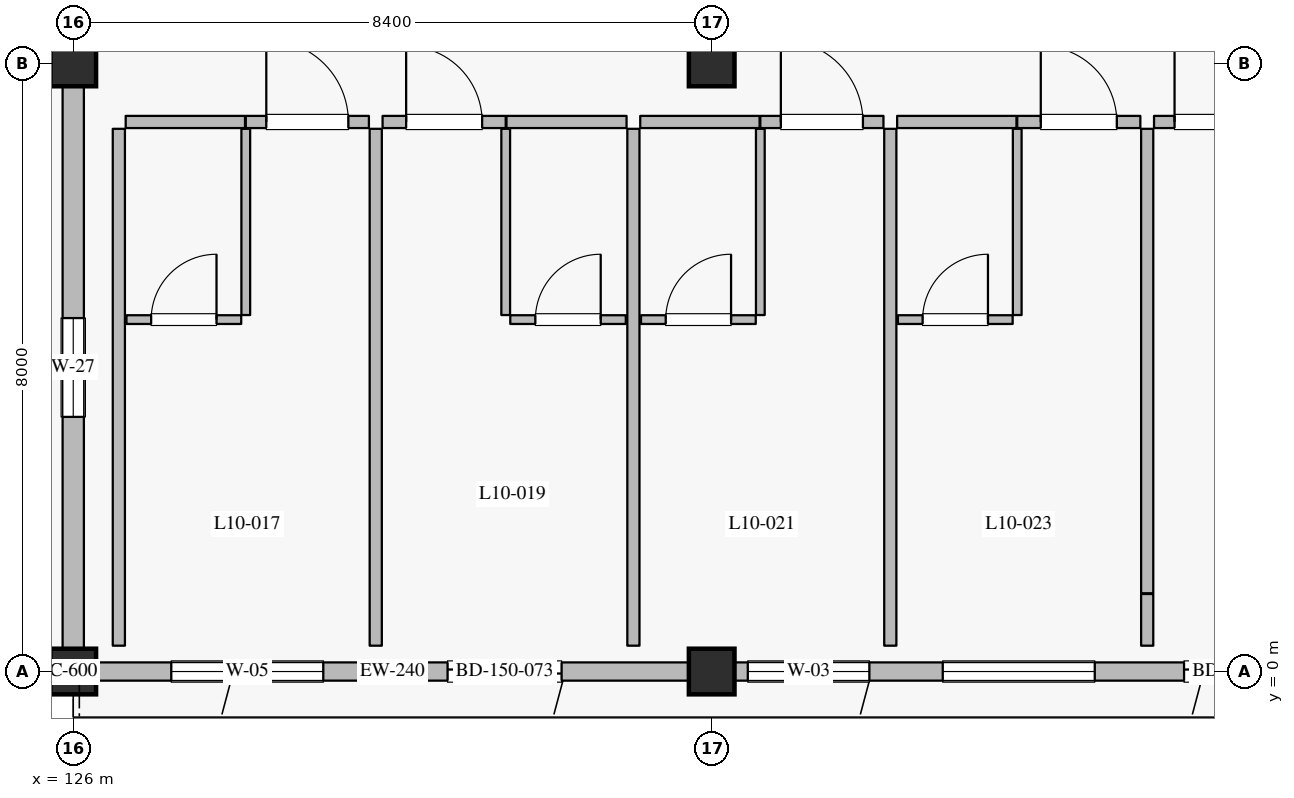
"""IFC4 building model, lengths in metres.
Left out: names, types, materials, properties, quantities, classifications, styles, units other than length and angle.
Written with IfcOpenShell. Run it as: python <this file> out.ifc"""

import sys

from ifc_helpers import new_model, si_unit, direction, frame, frame_2d, origin, origin_2d, place, context, subcontext, project, spatial, rectangle, extrude, element, fill, save


model = new_model("IFC4")
c1 = context("Model", 3, precision=1e-05, world=origin(), true_north=direction((0.0, 1.0)))
c2 = subcontext(c1, "Body", "Model", "MODEL_VIEW")
j1 = project(units=[si_unit("LENGTHUNIT", "METRE"), si_unit("PLANEANGLEUNIT", "RADIAN")], contexts=[c1])
p1 = place(None, origin())
s1 = spatial("IfcSite", under=j1, at=p1, CompositionType="ELEMENT")
p2 = place(p1, origin())
s2 = spatial("IfcBuilding", under=s1, at=p2, CompositionType="ELEMENT")
p3 = place(p2, frame((0.0, 0.0, 43.2)))
s3 = spatial("IfcBuildingStorey", under=s2, at=p3, CompositionType="ELEMENT", Elevation=43.2)
for number, where, z_axis, x_axis in (
    (1, (126.0, 0.0, 0.0), (0.0, 0.0, 1.0), (1.0, 0.0, 0.0)),
    (2, (134.4, 0.0, 0.0), (0.0, 0.0, 1.0), (1.0, 0.0, 0.0)),
    (3, (126.0, 8.0, 0.0), (0.0, 0.0, 1.0), (1.0, 0.0, 0.0)),
    (4, (134.4, 8.0, 0.0), (0.0, 0.0, 1.0), (1.0, 0.0, 0.0)),
):
    element("IfcColumn", number, at=place(p3, frame(where, z_axis=z_axis, x_axis=x_axis)), inside=s3, PredefinedType="COLUMN", context=c2, shape_type="SweptSolid", body=[
        extrude(rectangle(XDim=0.6, YDim=0.6, at=origin_2d()), origin(), (0.0, 0.0, 1.0), 4.2),
    ])
p4 = place(p3, frame((134.1, 0.0, 0.0), z_axis=(0.0, 0.0, 1.0), x_axis=(-1.0, 0.0, 0.0)))
e5 = element("IfcWall", 5, at=p4, inside=s3, PredefinedType="SOLIDWALL", context=c2, shape_type="SweptSolid", body=[
    extrude(rectangle(XDim=7.8, YDim=0.24, at=frame_2d((3.9, 0.0))), origin(), (0.0, 0.0, 1.0), 3.54),
])
p5 = place(p4, frame((1.675, 0.0, 0.0)))
e6 = element("IfcOpeningElement", 6, at=p5, cuts=e5, PredefinedType="OPENING", context=c2, shape_type="SweptSolid", body=[
    extrude(rectangle(XDim=1.5, YDim=2.25, at=frame_2d((0.75, 1.125))), frame((0.0, 0.13, 0.0), z_axis=(0.0, -1.0, 0.0), x_axis=(1.0, 0.0, 0.0)), (0.0, 0.0, 1.0), 0.26),
])
p6 = place(p4, frame((4.81, 0.0, 0.8)))
e7 = element("IfcOpeningElement", 7, at=p6, cuts=e5, PredefinedType="OPENING", context=c2, shape_type="SweptSolid", body=[
    extrude(rectangle(XDim=2.0, YDim=1.75, at=frame_2d((1.0, 0.875))), frame((0.0, 0.13, 0.0), z_axis=(0.0, -1.0, 0.0), x_axis=(1.0, 0.0, 0.0)), (0.0, 0.0, 1.0), 0.26),
])
p7 = place(p3, frame((142.5, 0.0, 0.0), z_axis=(0.0, 0.0, 1.0), x_axis=(-1.0, 0.0, 0.0)))
e8 = element("IfcWall", 8, at=p7, inside=s3, PredefinedType="SOLIDWALL", context=c2, shape_type="SweptSolid", body=[
    extrude(rectangle(XDim=7.8, YDim=0.24, at=frame_2d((3.9, 0.0))), origin(), (0.0, 0.0, 1.0), 3.54),
])
p8 = place(p7, frame((0.385, 0.0, 0.0)))
e9 = element("IfcOpeningElement", 9, at=p8, cuts=e8, PredefinedType="OPENING", context=c2, shape_type="SweptSolid", body=[
    extrude(rectangle(XDim=1.5, YDim=2.25, at=frame_2d((0.75, 1.125))), frame((0.0, 0.13, 0.0), z_axis=(0.0, -1.0, 0.0), x_axis=(1.0, 0.0, 0.0)), (0.0, 0.0, 1.0), 0.26),
])
p9 = place(p7, frame((3.06, 0.0, 0.8)))
e10 = element("IfcOpeningElement", 10, at=p9, cuts=e8, PredefinedType="OPENING", context=c2, shape_type="SweptSolid", body=[
    extrude(rectangle(XDim=2.0, YDim=1.75, at=frame_2d((1.0, 0.875))), frame((0.0, 0.13, 0.0), z_axis=(0.0, -1.0, 0.0), x_axis=(1.0, 0.0, 0.0)), (0.0, 0.0, 1.0), 0.26),
])
p10 = place(p7, frame((6.025, 0.0, 0.8)))
e11 = element("IfcOpeningElement", 11, at=p10, cuts=e8, PredefinedType="OPENING", context=c2, shape_type="SweptSolid", body=[
    extrude(rectangle(XDim=1.6, YDim=1.6, at=frame_2d((0.8, 0.8))), frame((0.0, 0.13, 0.0), z_axis=(0.0, -1.0, 0.0), x_axis=(1.0, 0.0, 0.0)), (0.0, 0.0, 1.0), 0.26),
])
p11 = place(p3, frame((126.0, 0.3, 0.0), z_axis=(0.0, 0.0, 1.0), x_axis=(0.0, 1.0, 0.0)))
e12 = element("IfcWall", 12, at=p11, inside=s3, PredefinedType="SOLIDWALL", context=c2, shape_type="SweptSolid", body=[
    extrude(rectangle(XDim=7.4, YDim=0.28, at=frame_2d((3.7, 0.0))), origin(), (0.0, 0.0, 1.0), 3.3),
])
p12 = place(p11, frame((3.05, 0.0, 0.75)))
e13 = element("IfcOpeningElement", 13, at=p12, cuts=e12, PredefinedType="OPENING", context=c2, shape_type="SweptSolid", body=[
    extrude(rectangle(XDim=1.3, YDim=1.65, at=frame_2d((0.65, 0.825))), frame((0.0, 0.15, 0.0), z_axis=(0.0, -1.0, 0.0), x_axis=(1.0, 0.0, 0.0)), (0.0, 0.0, 1.0), 0.3),
])
p13 = place(p3, frame((126.69, 7.23, 0.0), z_axis=(0.0, 0.0, 1.0), x_axis=(1.0, 0.0, 0.0)))
e14 = element("IfcWall", 14, at=p13, inside=s3, PredefinedType="PARTITIONING", context=c2, shape_type="SweptSolid", body=[
    extrude(rectangle(XDim=1.57, YDim=0.16, at=frame_2d((0.785, 0.0))), origin(), (0.0, 0.0, 1.0), 3.935),
])
p14 = place(p3, frame((128.27, 7.23, 0.0), z_axis=(0.0, 0.0, 1.0), x_axis=(1.0, 0.0, 0.0)))
e15 = element("IfcWall", 15, at=p14, inside=s3, PredefinedType="PARTITIONING", context=c2, shape_type="SweptSolid", body=[
    extrude(rectangle(XDim=1.62, YDim=0.16, at=frame_2d((0.81, 0.0))), origin(), (0.0, 0.0, 1.0), 3.935),
])
p15 = place(p14, frame((0.27, 0.0, 0.0)))
e16 = element("IfcOpeningElement", 16, at=p15, cuts=e15, PredefinedType="OPENING", context=c2, shape_type="SweptSolid", body=[
    extrude(rectangle(XDim=1.08, YDim=2.3, at=frame_2d((0.54, 1.15))), frame((0.0, 0.09, 0.0), z_axis=(0.0, -1.0, 0.0), x_axis=(1.0, 0.0, 0.0)), (0.0, 0.0, 1.0), 0.18),
])
p16 = place(p3, frame((128.27, 4.69, 0.0), z_axis=(0.0, 0.0, 1.0), x_axis=(0.0, 1.0, 0.0)))
e17 = element("IfcWall", 17, at=p16, inside=s3, PredefinedType="PARTITIONING", context=c2, shape_type="SweptSolid", body=[
    extrude(rectangle(XDim=2.45, YDim=0.115, at=frame_2d((1.225, 0.0))), origin(), (0.0, 0.0, 1.0), 3.935),
])
p17 = place(p3, frame((126.7, 4.63, 0.0), z_axis=(0.0, 0.0, 1.0), x_axis=(1.0, 0.0, 0.0)))
e18 = element("IfcWall", 18, at=p17, inside=s3, PredefinedType="PARTITIONING", context=c2, shape_type="SweptSolid", body=[
    extrude(rectangle(XDim=1.51, YDim=0.115, at=frame_2d((0.755, 0.0))), origin(), (0.0, 0.0, 1.0), 3.935),
])
p18 = place(p17, frame((0.325, 0.0, 0.0)))
e19 = element("IfcOpeningElement", 19, at=p18, cuts=e18, PredefinedType="OPENING", context=c2, shape_type="SweptSolid", body=[
    extrude(rectangle(XDim=0.86, YDim=2.12, at=frame_2d((0.43, 1.06))), frame((0.0, 0.067, 0.0), z_axis=(0.0, -1.0, 0.0), x_axis=(1.0, 0.0, 0.0)), (0.0, 0.0, 1.0), 0.135),
])
p19 = place(p3, frame((126.6, 0.34, 0.0), z_axis=(0.0, 0.0, 1.0), x_axis=(0.0, 1.0, 0.0)))
e20 = element("IfcWall", 20, at=p19, inside=s3, PredefinedType="PARTITIONING", context=c2, shape_type="SweptSolid", body=[
    extrude(rectangle(XDim=6.8, YDim=0.16, at=frame_2d((3.4, 0.0))), origin(), (0.0, 0.0, 1.0), 3.935),
])
p20 = place(p3, frame((130.07, 7.23, 0.0), z_axis=(0.0, 0.0, 1.0), x_axis=(1.0, 0.0, 0.0)))
e21 = element("IfcWall", 21, at=p20, inside=s3, PredefinedType="PARTITIONING", context=c2, shape_type="SweptSolid", body=[
    extrude(rectangle(XDim=1.62, YDim=0.16, at=frame_2d((0.81, 0.0))), origin(), (0.0, 0.0, 1.0), 3.935),
])
p21 = place(p20, frame((0.31, 0.0, 0.0)))
e22 = element("IfcOpeningElement", 22, at=p21, cuts=e21, PredefinedType="OPENING", context=c2, shape_type="SweptSolid", body=[
    extrude(rectangle(XDim=1.0, YDim=2.25, at=frame_2d((0.5, 1.125))), frame((0.0, 0.09, 0.0), z_axis=(0.0, -1.0, 0.0), x_axis=(1.0, 0.0, 0.0)), (0.0, 0.0, 1.0), 0.18),
])
p22 = place(p3, frame((131.7, 7.23, 0.0), z_axis=(0.0, 0.0, 1.0), x_axis=(1.0, 0.0, 0.0)))
e23 = element("IfcWall", 23, at=p22, inside=s3, PredefinedType="PARTITIONING", context=c2, shape_type="SweptSolid", body=[
    extrude(rectangle(XDim=1.58, YDim=0.16, at=frame_2d((0.79, 0.0))), origin(), (0.0, 0.0, 1.0), 3.935),
])
p23 = place(p3, frame((131.69, 4.69, 0.0), z_axis=(0.0, 0.0, 1.0), x_axis=(0.0, 1.0, 0.0)))
e24 = element("IfcWall", 24, at=p23, inside=s3, PredefinedType="PARTITIONING", context=c2, shape_type="SweptSolid", body=[
    extrude(rectangle(XDim=2.45, YDim=0.115, at=frame_2d((1.225, 0.0))), origin(), (0.0, 0.0, 1.0), 3.935),
])
p24 = place(p3, frame((131.75, 4.63, 0.0), z_axis=(0.0, 0.0, 1.0), x_axis=(1.0, 0.0, 0.0)))
e25 = element("IfcWall", 25, at=p24, inside=s3, PredefinedType="PARTITIONING", context=c2, shape_type="SweptSolid", body=[
    extrude(rectangle(XDim=1.52, YDim=0.115, at=frame_2d((0.76, 0.0))), origin(), (0.0, 0.0, 1.0), 3.935),
])
p25 = place(p24, frame((0.33, 0.0, 0.0)))
e26 = element("IfcOpeningElement", 26, at=p25, cuts=e25, PredefinedType="OPENING", context=c2, shape_type="SweptSolid", body=[
    extrude(rectangle(XDim=0.86, YDim=2.12, at=frame_2d((0.43, 1.06))), frame((0.0, 0.067, 0.0), z_axis=(0.0, -1.0, 0.0), x_axis=(1.0, 0.0, 0.0)), (0.0, 0.0, 1.0), 0.135),
])
p26 = place(p3, frame((129.98, 0.34, 0.0), z_axis=(0.0, 0.0, 1.0), x_axis=(0.0, 1.0, 0.0)))
e27 = element("IfcWall", 27, at=p26, inside=s3, PredefinedType="PARTITIONING", context=c2, shape_type="SweptSolid", body=[
    extrude(rectangle(XDim=6.8, YDim=0.16, at=frame_2d((3.4, 0.0))), origin(), (0.0, 0.0, 1.0), 3.935),
])
p27 = place(p3, frame((133.46, 7.23, 0.0), z_axis=(0.0, 0.0, 1.0), x_axis=(1.0, 0.0, 0.0)))
e28 = element("IfcWall", 28, at=p27, inside=s3, PredefinedType="PARTITIONING", context=c2, shape_type="SweptSolid", body=[
    extrude(rectangle(XDim=1.57, YDim=0.16, at=frame_2d((0.785, 0.0))), origin(), (0.0, 0.0, 1.0), 3.935),
])
p28 = place(p3, frame((135.04, 7.23, 0.0), z_axis=(0.0, 0.0, 1.0), x_axis=(1.0, 0.0, 0.0)))
e29 = element("IfcWall", 29, at=p28, inside=s3, PredefinedType="PARTITIONING", context=c2, shape_type="SweptSolid", body=[
    extrude(rectangle(XDim=1.62, YDim=0.16, at=frame_2d((0.81, 0.0))), origin(), (0.0, 0.0, 1.0), 3.935),
])
p29 = place(p28, frame((0.27, 0.0, 0.0)))
e30 = element("IfcOpeningElement", 30, at=p29, cuts=e29, PredefinedType="OPENING", context=c2, shape_type="SweptSolid", body=[
    extrude(rectangle(XDim=1.08, YDim=2.3, at=frame_2d((0.54, 1.15))), frame((0.0, 0.09, 0.0), z_axis=(0.0, -1.0, 0.0), x_axis=(1.0, 0.0, 0.0)), (0.0, 0.0, 1.0), 0.18),
])
p30 = place(p3, frame((135.04, 4.69, 0.0), z_axis=(0.0, 0.0, 1.0), x_axis=(0.0, 1.0, 0.0)))
e31 = element("IfcWall", 31, at=p30, inside=s3, PredefinedType="PARTITIONING", context=c2, shape_type="SweptSolid", body=[
    extrude(rectangle(XDim=2.45, YDim=0.115, at=frame_2d((1.225, 0.0))), origin(), (0.0, 0.0, 1.0), 3.935),
])
p31 = place(p3, frame((133.47, 4.63, 0.0), z_axis=(0.0, 0.0, 1.0), x_axis=(1.0, 0.0, 0.0)))
e32 = element("IfcWall", 32, at=p31, inside=s3, PredefinedType="PARTITIONING", context=c2, shape_type="SweptSolid", body=[
    extrude(rectangle(XDim=1.51, YDim=0.115, at=frame_2d((0.755, 0.0))), origin(), (0.0, 0.0, 1.0), 3.935),
])
p32 = place(p31, frame((0.325, 0.0, 0.0)))
e33 = element("IfcOpeningElement", 33, at=p32, cuts=e32, PredefinedType="OPENING", context=c2, shape_type="SweptSolid", body=[
    extrude(rectangle(XDim=0.86, YDim=2.12, at=frame_2d((0.43, 1.06))), frame((0.0, 0.067, 0.0), z_axis=(0.0, -1.0, 0.0), x_axis=(1.0, 0.0, 0.0)), (0.0, 0.0, 1.0), 0.135),
])
p33 = place(p3, frame((133.37, 0.34, 0.0), z_axis=(0.0, 0.0, 1.0), x_axis=(0.0, 1.0, 0.0)))
e34 = element("IfcWall", 34, at=p33, inside=s3, PredefinedType="PARTITIONING", context=c2, shape_type="SweptSolid", body=[
    extrude(rectangle(XDim=6.8, YDim=0.16, at=frame_2d((3.4, 0.0))), origin(), (0.0, 0.0, 1.0), 3.935),
])
p34 = place(p3, frame((136.84, 7.23, 0.0), z_axis=(0.0, 0.0, 1.0), x_axis=(1.0, 0.0, 0.0)))
e35 = element("IfcWall", 35, at=p34, inside=s3, PredefinedType="PARTITIONING", context=c2, shape_type="SweptSolid", body=[
    extrude(rectangle(XDim=1.57, YDim=0.16, at=frame_2d((0.785, 0.0))), origin(), (0.0, 0.0, 1.0), 3.935),
])
p35 = place(p3, frame((138.42, 7.23, 0.0), z_axis=(0.0, 0.0, 1.0), x_axis=(1.0, 0.0, 0.0)))
e36 = element("IfcWall", 36, at=p35, inside=s3, PredefinedType="PARTITIONING", context=c2, shape_type="SweptSolid", body=[
    extrude(rectangle(XDim=1.62, YDim=0.16, at=frame_2d((0.81, 0.0))), origin(), (0.0, 0.0, 1.0), 3.935),
])
p36 = place(p35, frame((0.31, 0.0, 0.0)))
e37 = element("IfcOpeningElement", 37, at=p36, cuts=e36, PredefinedType="OPENING", context=c2, shape_type="SweptSolid", body=[
    extrude(rectangle(XDim=1.0, YDim=2.25, at=frame_2d((0.5, 1.125))), frame((0.0, 0.09, 0.0), z_axis=(0.0, -1.0, 0.0), x_axis=(1.0, 0.0, 0.0)), (0.0, 0.0, 1.0), 0.18),
])
p37 = place(p3, frame((138.42, 4.69, 0.0), z_axis=(0.0, 0.0, 1.0), x_axis=(0.0, 1.0, 0.0)))
e38 = element("IfcWall", 38, at=p37, inside=s3, PredefinedType="PARTITIONING", context=c2, shape_type="SweptSolid", body=[
    extrude(rectangle(XDim=2.45, YDim=0.115, at=frame_2d((1.225, 0.0))), origin(), (0.0, 0.0, 1.0), 3.935),
])
p38 = place(p3, frame((136.85, 4.63, 0.0), z_axis=(0.0, 0.0, 1.0), x_axis=(1.0, 0.0, 0.0)))
e39 = element("IfcWall", 39, at=p38, inside=s3, PredefinedType="PARTITIONING", context=c2, shape_type="SweptSolid", body=[
    extrude(rectangle(XDim=1.51, YDim=0.115, at=frame_2d((0.755, 0.0))), origin(), (0.0, 0.0, 1.0), 3.935),
])
p39 = place(p38, frame((0.325, 0.0, 0.0)))
e40 = element("IfcOpeningElement", 40, at=p39, cuts=e39, PredefinedType="OPENING", context=c2, shape_type="SweptSolid", body=[
    extrude(rectangle(XDim=0.86, YDim=2.12, at=frame_2d((0.43, 1.06))), frame((0.0, 0.067, 0.0), z_axis=(0.0, -1.0, 0.0), x_axis=(1.0, 0.0, 0.0)), (0.0, 0.0, 1.0), 0.135),
])
p40 = place(p3, frame((136.75, 0.34, 0.0), z_axis=(0.0, 0.0, 1.0), x_axis=(0.0, 1.0, 0.0)))
e41 = element("IfcWall", 41, at=p40, inside=s3, PredefinedType="PARTITIONING", context=c2, shape_type="SweptSolid", body=[
    extrude(rectangle(XDim=6.8, YDim=0.16, at=frame_2d((3.4, 0.0))), origin(), (0.0, 0.0, 1.0), 3.935),
])
p41 = place(p3, frame((140.13, 0.34, 0.0), z_axis=(0.0, 0.0, 1.0), x_axis=(0.0, 1.0, 0.0)))
e42 = element("IfcWall", 42, at=p41, inside=s3, PredefinedType="PARTITIONING", context=c2, shape_type="SweptSolid", body=[
    extrude(rectangle(XDim=0.68, YDim=0.16, at=frame_2d((0.34, 0.0))), origin(), (0.0, 0.0, 1.0), 3.935),
])
p42 = place(p3, frame((140.22, 7.23, 0.0), z_axis=(0.0, 0.0, 1.0), x_axis=(1.0, 0.0, 0.0)))
e43 = element("IfcWall", 43, at=p42, inside=s3, PredefinedType="PARTITIONING", context=c2, shape_type="SweptSolid", body=[
    extrude(rectangle(XDim=1.62, YDim=0.16, at=frame_2d((0.81, 0.0))), origin(), (0.0, 0.0, 1.0), 3.935),
])
p43 = place(p42, frame((0.27, 0.0, 0.0)))
e44 = element("IfcOpeningElement", 44, at=p43, cuts=e43, PredefinedType="OPENING", context=c2, shape_type="SweptSolid", body=[
    extrude(rectangle(XDim=1.08, YDim=2.3, at=frame_2d((0.54, 1.15))), frame((0.0, 0.09, 0.0), z_axis=(0.0, -1.0, 0.0), x_axis=(1.0, 0.0, 0.0)), (0.0, 0.0, 1.0), 0.18),
])
p44 = place(p3, frame((140.13, 1.03, 0.0), z_axis=(0.0, 0.0, 1.0), x_axis=(0.0, 1.0, 0.0)))
e45 = element("IfcWall", 45, at=p44, inside=s3, PredefinedType="PARTITIONING", context=c2, shape_type="SweptSolid", body=[
    extrude(rectangle(XDim=6.11, YDim=0.16, at=frame_2d((3.055, 0.0))), origin(), (0.0, 0.0, 1.0), 3.935),
])
p45 = place(p5, origin())
e46 = element("IfcDoor", 46, at=p45, inside=s3, OperationType="SLIDING_TO_LEFT", PredefinedType="DOOR", context=c2, shape_type="SweptSolid", body=[
    extrude(rectangle(XDim=1.5, YDim=2.25, at=frame_2d((0.75, 1.125))), frame((0.0, 0.025, 0.0), z_axis=(0.0, -1.0, 0.0), x_axis=(1.0, 0.0, 0.0)), (0.0, 0.0, 1.0), 0.05),
])
fill(e6, e46)
p46 = place(p6, origin())
e47 = element("IfcWindow", 47, at=p46, inside=s3, PartitioningType="DOUBLE_PANEL_VERTICAL", PredefinedType="WINDOW", context=c2, shape_type="SweptSolid", body=[
    extrude(rectangle(XDim=2.0, YDim=1.75, at=frame_2d((1.0, 0.875))), frame((0.0, 0.03, 0.0), z_axis=(0.0, -1.0, 0.0), x_axis=(1.0, 0.0, 0.0)), (0.0, 0.0, 1.0), 0.06),
])
fill(e7, e47)
p47 = place(p8, origin())
e48 = element("IfcDoor", 48, at=p47, inside=s3, OperationType="SLIDING_TO_LEFT", PredefinedType="DOOR", context=c2, shape_type="SweptSolid", body=[
    extrude(rectangle(XDim=1.5, YDim=2.25, at=frame_2d((0.75, 1.125))), frame((0.0, 0.025, 0.0), z_axis=(0.0, -1.0, 0.0), x_axis=(1.0, 0.0, 0.0)), (0.0, 0.0, 1.0), 0.05),
])
fill(e9, e48)
p48 = place(p9, origin())
e49 = element("IfcWindow", 49, at=p48, inside=s3, PartitioningType="DOUBLE_PANEL_VERTICAL", PredefinedType="WINDOW", context=c2, shape_type="SweptSolid", body=[
    extrude(rectangle(XDim=2.0, YDim=1.75, at=frame_2d((1.0, 0.875))), frame((0.0, 0.03, 0.0), z_axis=(0.0, -1.0, 0.0), x_axis=(1.0, 0.0, 0.0)), (0.0, 0.0, 1.0), 0.06),
])
fill(e10, e49)
p49 = place(p10, origin())
e50 = element("IfcWindow", 50, at=p49, inside=s3, PartitioningType="SINGLE_PANEL", PredefinedType="WINDOW", context=c2, shape_type="SweptSolid", body=[
    extrude(rectangle(XDim=1.6, YDim=1.6, at=frame_2d((0.8, 0.8))), frame((0.0, 0.03, 0.0), z_axis=(0.0, -1.0, 0.0), x_axis=(1.0, 0.0, 0.0)), (0.0, 0.0, 1.0), 0.06),
])
fill(e11, e50)
p50 = place(p12, origin())
e51 = element("IfcWindow", 51, at=p50, inside=s3, PartitioningType="SINGLE_PANEL", PredefinedType="WINDOW", context=c2, shape_type="SweptSolid", body=[
    extrude(rectangle(XDim=1.3, YDim=1.65, at=frame_2d((0.65, 0.825))), frame((0.0, 0.03, 0.0), z_axis=(0.0, -1.0, 0.0), x_axis=(1.0, 0.0, 0.0)), (0.0, 0.0, 1.0), 0.06),
])
fill(e13, e51)
p51 = place(p15, origin())
e52 = element("IfcDoor", 52, at=p51, inside=s3, OperationType="SINGLE_SWING_LEFT", PredefinedType="DOOR", context=c2, shape_type="SweptSolid", body=[
    extrude(rectangle(XDim=1.08, YDim=2.3, at=frame_2d((0.54, 1.15))), frame((0.0, 0.025, 0.0), z_axis=(0.0, -1.0, 0.0), x_axis=(1.0, 0.0, 0.0)), (0.0, 0.0, 1.0), 0.05),
])
fill(e16, e52)
p52 = place(p18, origin())
e53 = element("IfcDoor", 53, at=p52, inside=s3, OperationType="SINGLE_SWING_RIGHT", PredefinedType="DOOR", context=c2, shape_type="SweptSolid", body=[
    extrude(rectangle(XDim=0.86, YDim=2.12, at=frame_2d((0.43, 1.06))), frame((0.0, 0.025, 0.0), z_axis=(0.0, -1.0, 0.0), x_axis=(1.0, 0.0, 0.0)), (0.0, 0.0, 1.0), 0.05),
])
fill(e19, e53)
p53 = place(p21, origin())
e54 = element("IfcDoor", 54, at=p53, inside=s3, OperationType="SINGLE_SWING_LEFT", PredefinedType="DOOR", context=c2, shape_type="SweptSolid", body=[
    extrude(rectangle(XDim=1.0, YDim=2.25, at=frame_2d((0.5, 1.125))), frame((0.0, 0.025, 0.0), z_axis=(0.0, -1.0, 0.0), x_axis=(1.0, 0.0, 0.0)), (0.0, 0.0, 1.0), 0.05),
])
fill(e22, e54)
p54 = place(p25, origin())
e55 = element("IfcDoor", 55, at=p54, inside=s3, OperationType="SINGLE_SWING_RIGHT", PredefinedType="DOOR", context=c2, shape_type="SweptSolid", body=[
    extrude(rectangle(XDim=0.86, YDim=2.12, at=frame_2d((0.43, 1.06))), frame((0.0, 0.025, 0.0), z_axis=(0.0, -1.0, 0.0), x_axis=(1.0, 0.0, 0.0)), (0.0, 0.0, 1.0), 0.05),
])
fill(e26, e55)
p55 = place(p29, origin())
e56 = element("IfcDoor", 56, at=p55, inside=s3, OperationType="SINGLE_SWING_LEFT", PredefinedType="DOOR", context=c2, shape_type="SweptSolid", body=[
    extrude(rectangle(XDim=1.08, YDim=2.3, at=frame_2d((0.54, 1.15))), frame((0.0, 0.025, 0.0), z_axis=(0.0, -1.0, 0.0), x_axis=(1.0, 0.0, 0.0)), (0.0, 0.0, 1.0), 0.05),
])
fill(e30, e56)
p56 = place(p32, origin())
e57 = element("IfcDoor", 57, at=p56, inside=s3, OperationType="SINGLE_SWING_RIGHT", PredefinedType="DOOR", context=c2, shape_type="SweptSolid", body=[
    extrude(rectangle(XDim=0.86, YDim=2.12, at=frame_2d((0.43, 1.06))), frame((0.0, 0.025, 0.0), z_axis=(0.0, -1.0, 0.0), x_axis=(1.0, 0.0, 0.0)), (0.0, 0.0, 1.0), 0.05),
])
fill(e33, e57)
p57 = place(p36, origin())
e58 = element("IfcDoor", 58, at=p57, inside=s3, OperationType="SINGLE_SWING_LEFT", PredefinedType="DOOR", context=c2, shape_type="SweptSolid", body=[
    extrude(rectangle(XDim=1.0, YDim=2.25, at=frame_2d((0.5, 1.125))), frame((0.0, 0.025, 0.0), z_axis=(0.0, -1.0, 0.0), x_axis=(1.0, 0.0, 0.0)), (0.0, 0.0, 1.0), 0.05),
])
fill(e37, e58)
p58 = place(p39, origin())
e59 = element("IfcDoor", 59, at=p58, inside=s3, OperationType="SINGLE_SWING_RIGHT", PredefinedType="DOOR", context=c2, shape_type="SweptSolid", body=[
    extrude(rectangle(XDim=0.86, YDim=2.12, at=frame_2d((0.43, 1.06))), frame((0.0, 0.025, 0.0), z_axis=(0.0, -1.0, 0.0), x_axis=(1.0, 0.0, 0.0)), (0.0, 0.0, 1.0), 0.05),
])
fill(e40, e59)
p59 = place(p43, origin())
e60 = element("IfcDoor", 60, at=p59, inside=s3, OperationType="SINGLE_SWING_LEFT", PredefinedType="DOOR", context=c2, shape_type="SweptSolid", body=[
    extrude(rectangle(XDim=1.08, YDim=2.3, at=frame_2d((0.54, 1.15))), frame((0.0, 0.025, 0.0), z_axis=(0.0, -1.0, 0.0), x_axis=(1.0, 0.0, 0.0)), (0.0, 0.0, 1.0), 0.05),
])
fill(e44, e60)
save(model, sys.argv[1])
